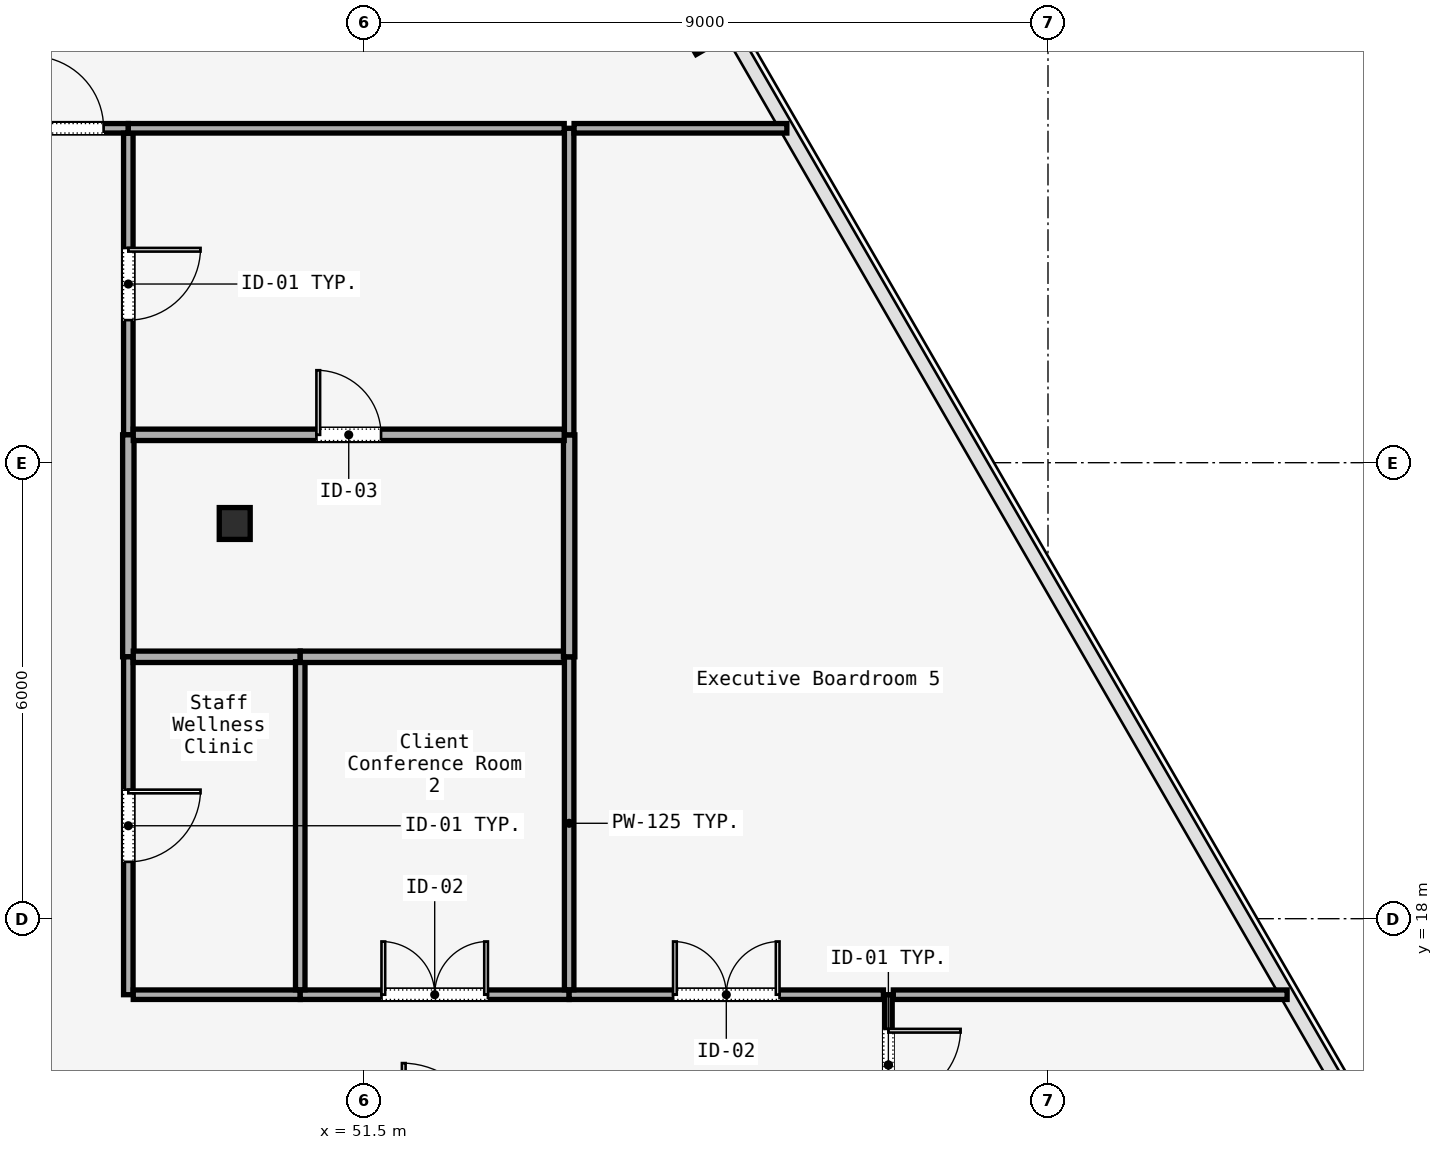
"""IFC4 building model, lengths in metres.
Left out: names, types, materials, properties, quantities, classifications, styles, units other than length and angle.
Written with IfcOpenShell. Run it as: python <this file> out.ifc"""

import sys

from ifc_helpers import new_model, si_unit, direction, frame, frame_2d, origin, origin_2d, place, context, subcontext, project, spatial, rectangle, i_section, extrude, element, fill, save


model = new_model("IFC4")
c1 = context("Model", 3, precision=1e-05, world=origin(), true_north=direction((0.0, 1.0)))
c2 = subcontext(c1, "Body", "Model", "MODEL_VIEW")
j1 = project(units=[si_unit("LENGTHUNIT", "METRE"), si_unit("PLANEANGLEUNIT", "RADIAN")], contexts=[c1])
p1 = place(None, origin())
s1 = spatial("IfcSite", under=j1, at=p1, CompositionType="ELEMENT")
p2 = place(p1, origin())
s2 = spatial("IfcBuilding", under=s1, at=p2, CompositionType="ELEMENT")
p3 = place(p2, frame((0.0, 0.0, 184.0)))
s3 = spatial("IfcBuildingStorey", under=s2, at=p3, CompositionType="ELEMENT", Elevation=184.0)
p4 = place(p3, frame((49.8, 23.2, 0.0), z_axis=(0.0, 0.0, 1.0), x_axis=(1.0, 0.0, 0.0)))
e1 = element("IfcColumn", 1, at=p4, inside=s3, PredefinedType="COLUMN", context=c2, shape_type="SweptSolid", body=[
    extrude(i_section(OverallWidth=0.407, OverallDepth=0.419, WebThickness=0.031, FlangeThickness=0.049, FilletRadius=0.015, at=origin_2d()), origin(), (0.0, 0.0, 1.0), 3.58),
])
p5 = place(p3, frame((55.964, 29.666, 0.0), z_axis=(0.0, 0.0, 1.0), x_axis=(-0.5, 0.866025403784, 0.0)))
e2 = element("IfcColumn", 2, at=p5, inside=s3, PredefinedType="COLUMN", context=c2, shape_type="SweptSolid", body=[
    extrude(i_section(OverallWidth=0.418, OverallDepth=0.455, WebThickness=0.042, FlangeThickness=0.052, FilletRadius=0.015, at=origin_2d()), origin(), (0.0, 0.0, 1.0), 3.58),
])
p6 = place(p3, frame((58.4, 17.0, 0.0), z_axis=(0.0, 0.0, 1.0), x_axis=(0.0, -1.0, 0.0)))
e3 = element("IfcWall", 3, at=p6, inside=s3, PredefinedType="MOVABLE", context=c2, shape_type="SweptSolid", body=[
    extrude(rectangle(XDim=1.85, YDim=0.1, at=frame_2d((0.925, 0.0))), origin(), (0.0, 0.0, 1.0), 3.01),
])
p7 = place(p6, frame((0.45, 0.0, 0.0)))
e4 = element("IfcOpeningElement", 4, at=p7, cuts=e3, PredefinedType="OPENING", context=c2, shape_type="SweptSolid", body=[
    extrude(rectangle(XDim=0.95, YDim=2.2, at=frame_2d((0.475, 1.1))), frame((0.0, 0.05, 0.0), z_axis=(0.0, -1.0, 0.0), x_axis=(1.0, 0.0, 0.0)), (0.0, 0.0, 1.0), 0.1),
])
p8 = place(p3, frame((46.8, 28.4, 0.0), z_axis=(0.0, 0.0, 1.0), x_axis=(1.0, 0.0, 0.0)))
e5 = element("IfcWall", 5, at=p8, inside=s3, PredefinedType="PARTITIONING", context=c2, shape_type="SweptSolid", body=[
    extrude(rectangle(XDim=1.6, YDim=0.125, at=frame_2d((0.8, 0.0))), origin(), (0.0, 0.0, 1.0), 3.01),
])
p9 = place(p8, frame((0.325, 0.0, 0.0)))
e6 = element("IfcOpeningElement", 6, at=p9, cuts=e5, PredefinedType="OPENING", context=c2, shape_type="SweptSolid", body=[
    extrude(rectangle(XDim=0.95, YDim=2.2, at=frame_2d((0.475, 1.1))), frame((0.0, 0.062, 0.0), z_axis=(0.0, -1.0, 0.0), x_axis=(1.0, 0.0, 0.0)), (0.0, 0.0, 1.0), 0.125),
])
p10 = place(p3, frame((48.4, 28.335, 0.0), z_axis=(0.0, 0.0, 1.0), x_axis=(0.0, -1.0, 0.0)))
e7 = element("IfcWall", 7, at=p10, inside=s3, PredefinedType="PARTITIONING", context=c2, shape_type="SweptSolid", body=[
    extrude(rectangle(XDim=3.968, YDim=0.125, at=frame_2d((1.984, 0.0))), origin(), (0.0, 0.0, 1.0), 3.01),
])
p11 = place(p10, frame((1.509, 0.0, 0.0)))
e8 = element("IfcOpeningElement", 8, at=p11, cuts=e7, PredefinedType="OPENING", context=c2, shape_type="SweptSolid", body=[
    extrude(rectangle(XDim=0.95, YDim=2.2, at=frame_2d((0.475, 1.1))), frame((0.0, 0.062, 0.0), z_axis=(0.0, -1.0, 0.0), x_axis=(1.0, 0.0, 0.0)), (0.0, 0.0, 1.0), 0.125),
])
p12 = place(p3, frame((48.4, 24.367, 0.0), z_axis=(0.0, 0.0, 1.0), x_axis=(0.0, -1.0, 0.0)))
e9 = element("IfcWall", 9, at=p12, inside=s3, PredefinedType="PARTITIONING", context=c2, shape_type="SweptSolid", body=[
    extrude(rectangle(XDim=2.921, YDim=0.15, at=frame_2d((1.46, 0.0))), origin(), (0.0, 0.0, 1.0), 3.01),
])
p13 = place(p3, frame((48.4, 21.446, 0.0), z_axis=(0.0, 0.0, 1.0), x_axis=(0.0, -1.0, 0.0)))
e10 = element("IfcWall", 10, at=p13, inside=s3, PredefinedType="PARTITIONING", context=c2, shape_type="SweptSolid", body=[
    extrude(rectangle(XDim=4.446, YDim=0.125, at=frame_2d((2.223, 0.0))), origin(), (0.0, 0.0, 1.0), 3.01),
])
p14 = place(p13, frame((1.748, 0.0, 0.0)))
e11 = element("IfcOpeningElement", 11, at=p14, cuts=e10, PredefinedType="OPENING", context=c2, shape_type="SweptSolid", body=[
    extrude(rectangle(XDim=0.95, YDim=2.2, at=frame_2d((0.475, 1.1))), frame((0.0, 0.062, 0.0), z_axis=(0.0, -1.0, 0.0), x_axis=(1.0, 0.0, 0.0)), (0.0, 0.0, 1.0), 0.125),
])
p15 = place(p3, frame((48.465, 17.0, 0.0), z_axis=(0.0, 0.0, 1.0), x_axis=(1.0, 0.0, 0.0)))
e12 = element("IfcWall", 12, at=p15, inside=s3, PredefinedType="PARTITIONING", context=c2, shape_type="SweptSolid", body=[
    extrude(rectangle(XDim=2.197, YDim=0.125, at=frame_2d((1.099, 0.0))), origin(), (0.0, 0.0, 1.0), 3.01),
])
p16 = place(p3, frame((50.662, 17.0, 0.0), z_axis=(0.0, 0.0, 1.0), x_axis=(1.0, 0.0, 0.0)))
e13 = element("IfcWall", 13, at=p16, inside=s3, PredefinedType="PARTITIONING", context=c2, shape_type="SweptSolid", body=[
    extrude(rectangle(XDim=3.538, YDim=0.125, at=frame_2d((1.769, 0.0))), origin(), (0.0, 0.0, 1.0), 3.01),
])
p17 = place(p16, frame((1.069, 0.0, 0.0)))
e14 = element("IfcOpeningElement", 14, at=p17, cuts=e13, PredefinedType="OPENING", context=c2, shape_type="SweptSolid", body=[
    extrude(rectangle(XDim=1.4, YDim=2.2, at=frame_2d((0.7, 1.1))), frame((0.0, 0.062, 0.0), z_axis=(0.0, -1.0, 0.0), x_axis=(1.0, 0.0, 0.0)), (0.0, 0.0, 1.0), 0.125),
])
p18 = place(p3, frame((54.2, 17.0, 0.0), z_axis=(0.0, 0.0, 1.0), x_axis=(1.0, 0.0, 0.0)))
e15 = element("IfcWall", 15, at=p18, inside=s3, PredefinedType="PARTITIONING", context=c2, shape_type="SweptSolid", body=[
    extrude(rectangle(XDim=4.135, YDim=0.125, at=frame_2d((2.067, 0.0))), origin(), (0.0, 0.0, 1.0), 3.01),
])
p19 = place(p18, frame((1.367, 0.0, 0.0)))
e16 = element("IfcOpeningElement", 16, at=p19, cuts=e15, PredefinedType="OPENING", context=c2, shape_type="SweptSolid", body=[
    extrude(rectangle(XDim=1.4, YDim=2.2, at=frame_2d((0.7, 1.1))), frame((0.0, 0.062, 0.0), z_axis=(0.0, -1.0, 0.0), x_axis=(1.0, 0.0, 0.0)), (0.0, 0.0, 1.0), 0.125),
])
p20 = place(p3, frame((58.465, 17.0, 0.0), z_axis=(0.0, 0.0, 1.0), x_axis=(1.0, 0.0, 0.0)))
e17 = element("IfcWall", 17, at=p20, inside=s3, PredefinedType="PARTITIONING", context=c2, shape_type="SweptSolid", body=[
    extrude(rectangle(XDim=5.181, YDim=0.125, at=frame_2d((2.59, 0.0))), origin(), (0.0, 0.0, 1.0), 3.01),
])
p21 = place(p3, frame((48.465, 21.446, 0.0), z_axis=(0.0, 0.0, 1.0), x_axis=(1.0, 0.0, 0.0)))
e18 = element("IfcWall", 18, at=p21, inside=s3, PredefinedType="PARTITIONING", context=c2, shape_type="SweptSolid", body=[
    extrude(rectangle(XDim=2.197, YDim=0.15, at=frame_2d((1.099, 0.0))), origin(), (0.0, 0.0, 1.0), 3.01),
])
p22 = place(p3, frame((50.662, 21.381, 0.0), z_axis=(0.0, 0.0, 1.0), x_axis=(0.0, -1.0, 0.0)))
e19 = element("IfcWall", 19, at=p22, inside=s3, PredefinedType="PARTITIONING", context=c2, shape_type="SweptSolid", body=[
    extrude(rectangle(XDim=4.316, YDim=0.125, at=frame_2d((2.158, 0.0))), origin(), (0.0, 0.0, 1.0), 3.01),
])
p23 = place(p3, frame((54.2, 21.446, 0.0), z_axis=(0.0, 0.0, 1.0), x_axis=(0.0, -1.0, 0.0)))
e20 = element("IfcWall", 20, at=p23, inside=s3, PredefinedType="PARTITIONING", context=c2, shape_type="SweptSolid", body=[
    extrude(rectangle(XDim=4.381, YDim=0.125, at=frame_2d((2.19, 0.0))), origin(), (0.0, 0.0, 1.0), 3.01),
])
p24 = place(p3, frame((50.662, 21.446, 0.0), z_axis=(0.0, 0.0, 1.0), x_axis=(1.0, 0.0, 0.0)))
e21 = element("IfcWall", 21, at=p24, inside=s3, PredefinedType="PARTITIONING", context=c2, shape_type="SweptSolid", body=[
    extrude(rectangle(XDim=3.473, YDim=0.15, at=frame_2d((1.736, 0.0))), origin(), (0.0, 0.0, 1.0), 3.01),
])
p25 = place(p3, frame((54.2, 21.446, 0.0), z_axis=(0.0, 0.0, 1.0), x_axis=(0.0, 1.0, 0.0)))
e22 = element("IfcWall", 22, at=p25, inside=s3, PredefinedType="PARTITIONING", context=c2, shape_type="SweptSolid", body=[
    extrude(rectangle(XDim=2.921, YDim=0.15, at=frame_2d((1.46, 0.0))), origin(), (0.0, 0.0, 1.0), 3.01),
])
p26 = place(p3, frame((54.2, 24.367, 0.0), z_axis=(0.0, 0.0, 1.0), x_axis=(0.0, 1.0, 0.0)))
e23 = element("IfcWall", 23, at=p26, inside=s3, PredefinedType="PARTITIONING", context=c2, shape_type="SweptSolid", body=[
    extrude(rectangle(XDim=4.033, YDim=0.125, at=frame_2d((2.017, 0.0))), origin(), (0.0, 0.0, 1.0), 3.01),
])
p27 = place(p3, frame((54.265, 28.4, 0.0), z_axis=(0.0, 0.0, 1.0), x_axis=(1.0, 0.0, 0.0)))
e24 = element("IfcWall", 24, at=p27, inside=s3, PredefinedType="PARTITIONING", context=c2, shape_type="SweptSolid", body=[
    extrude(rectangle(XDim=2.799, YDim=0.125, at=frame_2d((1.4, 0.0))), origin(), (0.0, 0.0, 1.0), 3.01),
])
p28 = place(p3, frame((48.465, 24.367, 0.0), z_axis=(0.0, 0.0, 1.0), x_axis=(1.0, 0.0, 0.0)))
e25 = element("IfcWall", 25, at=p28, inside=s3, PredefinedType="PARTITIONING", context=c2, shape_type="SweptSolid", body=[
    extrude(rectangle(XDim=5.67, YDim=0.15, at=frame_2d((2.835, 0.0))), origin(), (0.0, 0.0, 1.0), 3.01),
])
p29 = place(p28, frame((2.41, 0.0, 0.0)))
e26 = element("IfcOpeningElement", 26, at=p29, cuts=e25, PredefinedType="OPENING", context=c2, shape_type="SweptSolid", body=[
    extrude(rectangle(XDim=0.85, YDim=2.15, at=frame_2d((0.425, 1.075))), frame((0.0, 0.075, 0.0), z_axis=(0.0, -1.0, 0.0), x_axis=(1.0, 0.0, 0.0)), (0.0, 0.0, 1.0), 0.15),
])
p30 = place(p3, frame((48.4, 28.4, 0.0), z_axis=(0.0, 0.0, 1.0), x_axis=(1.0, 0.0, 0.0)))
e27 = element("IfcWall", 27, at=p30, inside=s3, PredefinedType="PARTITIONING", context=c2, shape_type="SweptSolid", body=[
    extrude(rectangle(XDim=5.735, YDim=0.125, at=frame_2d((2.868, 0.0))), origin(), (0.0, 0.0, 1.0), 3.01),
])
p31 = place(p7, origin())
e28 = element("IfcDoor", 28, at=p31, inside=s3, OperationType="SINGLE_SWING_RIGHT", PredefinedType="DOOR", context=c2, shape_type="SweptSolid", body=[
    extrude(rectangle(XDim=0.95, YDim=2.2, at=frame_2d((0.475, 1.1))), frame((0.0, 0.025, 0.0), z_axis=(0.0, -1.0, 0.0), x_axis=(1.0, 0.0, 0.0)), (0.0, 0.0, 1.0), 0.05),
])
fill(e4, e28)
p32 = place(p14, origin())
e29 = element("IfcDoor", 29, at=p32, inside=s3, OperationType="SINGLE_SWING_RIGHT", PredefinedType="DOOR", context=c2, shape_type="SweptSolid", body=[
    extrude(rectangle(XDim=0.95, YDim=2.2, at=frame_2d((0.475, 1.1))), frame((0.0, 0.025, 0.0), z_axis=(0.0, -1.0, 0.0), x_axis=(1.0, 0.0, 0.0)), (0.0, 0.0, 1.0), 0.05),
])
fill(e11, e29)
p33 = place(p17, origin())
e30 = element("IfcDoor", 30, at=p33, inside=s3, OperationType="SINGLE_SWING_LEFT", PredefinedType="DOOR", context=c2, shape_type="SweptSolid", body=[
    extrude(rectangle(XDim=1.4, YDim=2.2, at=frame_2d((0.7, 1.1))), frame((0.0, 0.025, 0.0), z_axis=(0.0, -1.0, 0.0), x_axis=(1.0, 0.0, 0.0)), (0.0, 0.0, 1.0), 0.05),
])
fill(e14, e30)
p34 = place(p19, origin())
e31 = element("IfcDoor", 31, at=p34, inside=s3, OperationType="SINGLE_SWING_LEFT", PredefinedType="DOOR", context=c2, shape_type="SweptSolid", body=[
    extrude(rectangle(XDim=1.4, YDim=2.2, at=frame_2d((0.7, 1.1))), frame((0.0, 0.025, 0.0), z_axis=(0.0, -1.0, 0.0), x_axis=(1.0, 0.0, 0.0)), (0.0, 0.0, 1.0), 0.05),
])
fill(e16, e31)
p35 = place(p29, origin())
e32 = element("IfcDoor", 32, at=p35, inside=s3, OperationType="SINGLE_SWING_LEFT", PredefinedType="DOOR", context=c2, shape_type="SweptSolid", body=[
    extrude(rectangle(XDim=0.85, YDim=2.15, at=frame_2d((0.425, 1.075))), frame((0.0, 0.025, 0.0), z_axis=(0.0, -1.0, 0.0), x_axis=(1.0, 0.0, 0.0)), (0.0, 0.0, 1.0), 0.05),
])
fill(e26, e32)
p36 = place(p11, origin())
e33 = element("IfcDoor", 33, at=p36, inside=s3, OperationType="SINGLE_SWING_LEFT", PredefinedType="DOOR", context=c2, shape_type="SweptSolid", body=[
    extrude(rectangle(XDim=0.95, YDim=2.2, at=frame_2d((0.475, 1.1))), frame((0.0, 0.025, 0.0), z_axis=(0.0, -1.0, 0.0), x_axis=(1.0, 0.0, 0.0)), (0.0, 0.0, 1.0), 0.05),
])
fill(e8, e33)
p37 = place(p9, origin())
e34 = element("IfcDoor", 34, at=p37, inside=s3, OperationType="SINGLE_SWING_LEFT", PredefinedType="DOOR", context=c2, shape_type="SweptSolid", body=[
    extrude(rectangle(XDim=0.95, YDim=2.2, at=frame_2d((0.475, 1.1))), frame((0.0, 0.025, 0.0), z_axis=(0.0, -1.0, 0.0), x_axis=(1.0, 0.0, 0.0)), (0.0, 0.0, 1.0), 0.05),
])
fill(e6, e34)
save(model, sys.argv[1])
